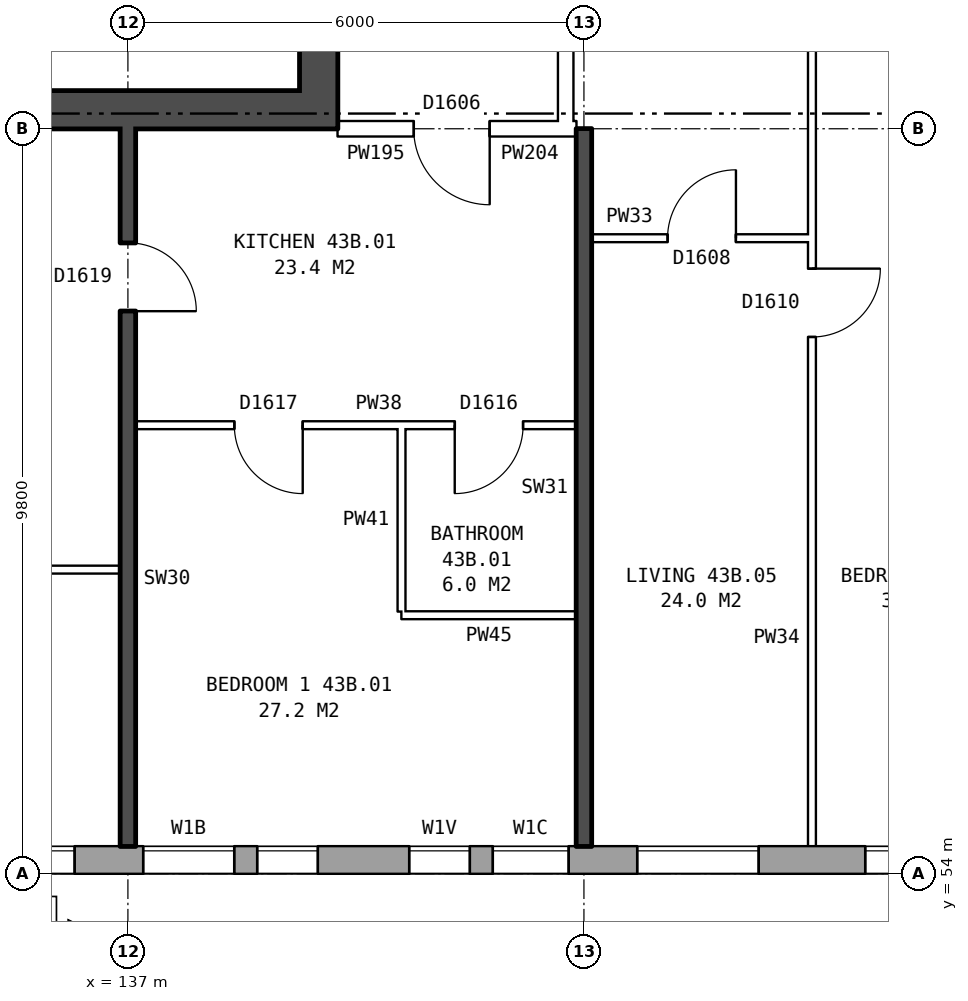
"""IFC4 building model, lengths in metres.
Left out: names, types, materials, properties, quantities, classifications, styles, units other than length and angle.
Written with IfcOpenShell. Run it as: python <this file> out.ifc"""

import sys

from ifc_helpers import new_model, si_unit, direction, frame, frame_2d, origin, place, context, subcontext, project, spatial, rectangle, extrude, element, fill, save


model = new_model("IFC4")
c1 = context("Model", 3, precision=1e-05, world=origin(), true_north=direction((0.0, 1.0)))
c2 = subcontext(c1, "Body", "Model", "MODEL_VIEW")
j1 = project(units=[si_unit("LENGTHUNIT", "METRE"), si_unit("PLANEANGLEUNIT", "RADIAN")], contexts=[c1])
p1 = place(None, origin())
s1 = spatial("IfcSite", under=j1, at=p1, CompositionType="ELEMENT")
p2 = place(p1, origin())
s2 = spatial("IfcBuilding", under=s1, at=p2, CompositionType="ELEMENT")
p3 = place(p2, frame((0.0, 0.0, 154.7)))
s3 = spatial("IfcBuildingStorey", under=s2, at=p3, CompositionType="ELEMENT", Elevation=154.7)
p4 = place(p3, frame((134.075, 54.18, 0.0), z_axis=(0.0, 0.0, 1.0), x_axis=(1.0, 0.0, 0.0)))
e1 = element("IfcWall", 1, at=p4, inside=s3, PredefinedType="STANDARD", context=c2, shape_type="SweptSolid", body=[
    extrude(rectangle(XDim=34.351, YDim=0.36, at=frame_2d((17.175, 0.0))), origin(), (0.0, 0.0, 1.0), 2.85),
])
p5 = place(p4, frame((0.625, 0.0, 0.8)))
e2 = element("IfcOpeningElement", 2, at=p5, cuts=e1, PredefinedType="OPENING", context=c2, shape_type="SweptSolid", body=[
    extrude(rectangle(XDim=1.6, YDim=1.8, at=frame_2d((0.8, 0.9))), frame((0.0, 0.19, 0.0), z_axis=(0.0, -1.0, 0.0), x_axis=(1.0, 0.0, 0.0)), (0.0, 0.0, 1.0), 0.38),
])
p6 = place(p4, frame((3.125, 0.0, 0.8)))
e3 = element("IfcOpeningElement", 3, at=p6, cuts=e1, PredefinedType="OPENING", context=c2, shape_type="SweptSolid", body=[
    extrude(rectangle(XDim=1.2, YDim=1.8, at=frame_2d((0.6, 0.9))), frame((0.0, 0.19, 0.0), z_axis=(0.0, -1.0, 0.0), x_axis=(1.0, 0.0, 0.0)), (0.0, 0.0, 1.0), 0.38),
])
p7 = place(p4, frame((4.625, 0.0, 1.7)))
e4 = element("IfcOpeningElement", 4, at=p7, cuts=e1, PredefinedType="OPENING", context=c2, shape_type="SweptSolid", body=[
    extrude(rectangle(XDim=0.8, YDim=0.9, at=frame_2d((0.4, 0.45))), frame((0.0, 0.19, 0.0), z_axis=(0.0, -1.0, 0.0), x_axis=(1.0, 0.0, 0.0)), (0.0, 0.0, 1.0), 0.38),
])
p8 = place(p4, frame((9.625, 0.0, 0.8)))
e5 = element("IfcOpeningElement", 5, at=p8, cuts=e1, PredefinedType="OPENING", context=c2, shape_type="SweptSolid", body=[
    extrude(rectangle(XDim=1.6, YDim=1.8, at=frame_2d((0.8, 0.9))), frame((0.0, 0.19, 0.0), z_axis=(0.0, -1.0, 0.0), x_axis=(1.0, 0.0, 0.0)), (0.0, 0.0, 1.0), 0.38),
])
p9 = place(p4, frame((12.625, 0.0, 0.8)))
e6 = element("IfcOpeningElement", 6, at=p9, cuts=e1, PredefinedType="OPENING", context=c2, shape_type="SweptSolid", body=[
    extrude(rectangle(XDim=1.6, YDim=1.8, at=frame_2d((0.8, 0.9))), frame((0.0, 0.19, 0.0), z_axis=(0.0, -1.0, 0.0), x_axis=(1.0, 0.0, 0.0)), (0.0, 0.0, 1.0), 0.38),
])
p10 = place(p4, frame((15.625, 0.0, 0.8)))
e7 = element("IfcOpeningElement", 7, at=p10, cuts=e1, PredefinedType="OPENING", context=c2, shape_type="SweptSolid", body=[
    extrude(rectangle(XDim=1.6, YDim=1.8, at=frame_2d((0.8, 0.9))), frame((0.0, 0.19, 0.0), z_axis=(0.0, -1.0, 0.0), x_axis=(1.0, 0.0, 0.0)), (0.0, 0.0, 1.0), 0.38),
])
p11 = place(p4, frame((18.625, 0.0, 0.8)))
e8 = element("IfcOpeningElement", 8, at=p11, cuts=e1, PredefinedType="OPENING", context=c2, shape_type="SweptSolid", body=[
    extrude(rectangle(XDim=1.6, YDim=1.8, at=frame_2d((0.8, 0.9))), frame((0.0, 0.19, 0.0), z_axis=(0.0, -1.0, 0.0), x_axis=(1.0, 0.0, 0.0)), (0.0, 0.0, 1.0), 0.38),
])
p12 = place(p4, frame((21.625, 0.0, 0.8)))
e9 = element("IfcOpeningElement", 9, at=p12, cuts=e1, PredefinedType="OPENING", context=c2, shape_type="SweptSolid", body=[
    extrude(rectangle(XDim=1.6, YDim=1.8, at=frame_2d((0.8, 0.9))), frame((0.0, 0.19, 0.0), z_axis=(0.0, -1.0, 0.0), x_axis=(1.0, 0.0, 0.0)), (0.0, 0.0, 1.0), 0.38),
])
p13 = place(p4, frame((24.625, 0.0, 0.8)))
e10 = element("IfcOpeningElement", 10, at=p13, cuts=e1, PredefinedType="OPENING", context=c2, shape_type="SweptSolid", body=[
    extrude(rectangle(XDim=1.6, YDim=1.8, at=frame_2d((0.8, 0.9))), frame((0.0, 0.19, 0.0), z_axis=(0.0, -1.0, 0.0), x_axis=(1.0, 0.0, 0.0)), (0.0, 0.0, 1.0), 0.38),
])
p14 = place(p4, frame((27.125, 0.0, 0.8)))
e11 = element("IfcOpeningElement", 11, at=p14, cuts=e1, PredefinedType="OPENING", context=c2, shape_type="SweptSolid", body=[
    extrude(rectangle(XDim=0.6, YDim=0.9, at=frame_2d((0.3, 0.45))), frame((0.0, 0.19, 0.0), z_axis=(0.0, -1.0, 0.0), x_axis=(1.0, 0.0, 0.0)), (0.0, 0.0, 1.0), 0.38),
])
p15 = place(p4, frame((30.625, 0.0, 0.8)))
e12 = element("IfcOpeningElement", 12, at=p15, cuts=e1, PredefinedType="OPENING", context=c2, shape_type="SweptSolid", body=[
    extrude(rectangle(XDim=1.6, YDim=1.8, at=frame_2d((0.8, 0.9))), frame((0.0, 0.19, 0.0), z_axis=(0.0, -1.0, 0.0), x_axis=(1.0, 0.0, 0.0)), (0.0, 0.0, 1.0), 0.38),
])
p16 = place(p4, frame((6.625, 0.0, 0.8)))
e13 = element("IfcOpeningElement", 13, at=p16, cuts=e1, PredefinedType="OPENING", context=c2, shape_type="SweptSolid", body=[
    extrude(rectangle(XDim=0.8, YDim=0.9, at=frame_2d((0.4, 0.45))), frame((0.0, 0.19, 0.0), z_axis=(0.0, -1.0, 0.0), x_axis=(1.0, 0.0, 0.0)), (0.0, 0.0, 1.0), 0.38),
])
p17 = place(p4, frame((7.725, 0.0, 0.8)))
e14 = element("IfcOpeningElement", 14, at=p17, cuts=e1, PredefinedType="OPENING", context=c2, shape_type="SweptSolid", body=[
    extrude(rectangle(XDim=1.0, YDim=1.8, at=frame_2d((0.5, 0.9))), frame((0.0, 0.19, 0.0), z_axis=(0.0, -1.0, 0.0), x_axis=(1.0, 0.0, 0.0)), (0.0, 0.0, 1.0), 0.38),
])
p18 = place(p4, frame((28.925, 0.0, 1.7)))
e15 = element("IfcOpeningElement", 15, at=p18, cuts=e1, PredefinedType="OPENING", context=c2, shape_type="SweptSolid", body=[
    extrude(rectangle(XDim=1.4, YDim=0.9, at=frame_2d((0.7, 0.45))), frame((0.0, 0.19, 0.0), z_axis=(0.0, -1.0, 0.0), x_axis=(1.0, 0.0, 0.0)), (0.0, 0.0, 1.0), 0.38),
])
p19 = place(p3, frame((139.51, 63.8, 0.0), z_axis=(0.0, 0.0, 1.0), x_axis=(0.0, 1.0, 0.0)))
e16 = element("IfcWall", 16, at=p19, inside=s3, PredefinedType="SHEAR", context=c2, shape_type="SweptSolid", body=[
    extrude(rectangle(XDim=12.4, YDim=0.5, at=frame_2d((6.2, 0.0))), origin(), (0.0, 0.0, 1.0), 2.85),
])
p20 = place(p19, frame((1.325, 0.0, 0.0)))
e17 = element("IfcOpeningElement", 17, at=p20, cuts=e16, PredefinedType="OPENING", context=c2, shape_type="SweptSolid", body=[
    extrude(rectangle(XDim=1.1, YDim=2.1, at=frame_2d((0.55, 1.05))), frame((0.0, 0.26, 0.0), z_axis=(0.0, -1.0, 0.0), x_axis=(1.0, 0.0, 0.0)), (0.0, 0.0, 1.0), 0.52),
])
p21 = place(p19, frame((3.6, 0.0, 0.0)))
e18 = element("IfcOpeningElement", 18, at=p21, cuts=e16, PredefinedType="OPENING", context=c2, shape_type="SweptSolid", body=[
    extrude(rectangle(XDim=1.1, YDim=2.1, at=frame_2d((0.55, 1.05))), frame((0.0, 0.26, 0.0), z_axis=(0.0, -1.0, 0.0), x_axis=(1.0, 0.0, 0.0)), (0.0, 0.0, 1.0), 0.52),
])
p22 = place(p19, frame((5.8, 0.0, 0.0)))
e19 = element("IfcOpeningElement", 19, at=p22, cuts=e16, PredefinedType="OPENING", context=c2, shape_type="SweptSolid", body=[
    extrude(rectangle(XDim=1.1, YDim=2.1, at=frame_2d((0.55, 1.05))), frame((0.0, 0.26, 0.0), z_axis=(0.0, -1.0, 0.0), x_axis=(1.0, 0.0, 0.0)), (0.0, 0.0, 1.0), 0.52),
])
p23 = place(p19, frame((9.9, 0.0, 0.0)))
e20 = element("IfcOpeningElement", 20, at=p23, cuts=e16, PredefinedType="OPENING", context=c2, shape_type="SweptSolid", body=[
    extrude(rectangle(XDim=1.1, YDim=2.1, at=frame_2d((0.55, 1.05))), frame((0.0, 0.26, 0.0), z_axis=(0.0, -1.0, 0.0), x_axis=(1.0, 0.0, 0.0)), (0.0, 0.0, 1.0), 0.52),
])
p24 = place(p19, frame((8.125, 0.0, 0.0)))
e21 = element("IfcOpeningElement", 21, at=p24, cuts=e16, PredefinedType="OPENING", context=c2, shape_type="SweptSolid", body=[
    extrude(rectangle(XDim=0.85, YDim=2.1, at=frame_2d((0.425, 1.05))), frame((0.0, 0.26, 0.0), z_axis=(0.0, -1.0, 0.0), x_axis=(1.0, 0.0, 0.0)), (0.0, 0.0, 1.0), 0.52),
])
p25 = place(p3, frame((139.26, 64.05, 0.0), z_axis=(0.0, 0.0, 1.0), x_axis=(-1.0, 0.0, 0.0)))
e22 = element("IfcWall", 22, at=p25, inside=s3, PredefinedType="SHEAR", context=c2, shape_type="SweptSolid", body=[
    extrude(rectangle(XDim=7.4, YDim=0.5, at=frame_2d((3.7, 0.0))), origin(), (0.0, 0.0, 1.0), 2.85),
])
p26 = place(p3, frame((142.76, 63.9, 0.0), z_axis=(0.0, 0.0, 1.0), x_axis=(0.0, 1.0, 0.0)))
e23 = element("IfcWall", 23, at=p26, inside=s3, PredefinedType="PARTITIONING", context=c2, shape_type="SweptSolid", body=[
    extrude(rectangle(XDim=12.2, YDim=0.2, at=frame_2d((6.1, 0.0))), origin(), (0.0, 0.0, 1.0), 2.85),
])
p27 = place(p26, frame((5.1, 0.0, 0.0)))
e24 = element("IfcOpeningElement", 24, at=p27, cuts=e23, PredefinedType="OPENING", context=c2, shape_type="SweptSolid", body=[
    extrude(rectangle(XDim=2.0, YDim=2.1, at=frame_2d((1.0, 1.05))), frame((0.0, 0.11, 0.0), z_axis=(0.0, -1.0, 0.0), x_axis=(1.0, 0.0, 0.0)), (0.0, 0.0, 1.0), 0.22),
])
p28 = place(p3, frame((140.6, 57.4, 0.0), z_axis=(0.0, 0.0, 1.0), x_axis=(1.0, 0.0, 0.0)))
e25 = element("IfcWall", 25, at=p28, inside=s3, PredefinedType="PARTITIONING", context=c2, shape_type="SweptSolid", body=[
    extrude(rectangle(XDim=2.3, YDim=0.1, at=frame_2d((1.15, 0.0))), origin(), (0.0, 0.0, 1.0), 2.85),
])
p29 = place(p3, frame((131.36, 58.0, 0.0), z_axis=(0.0, 0.0, 1.0), x_axis=(1.0, 0.0, 0.0)))
e26 = element("IfcWall", 26, at=p29, inside=s3, PredefinedType="PARTITIONING", context=c2, shape_type="SweptSolid", body=[
    extrude(rectangle(XDim=5.54, YDim=0.1, at=frame_2d((2.77, 0.0))), origin(), (0.0, 0.0, 1.0), 2.85),
])
p30 = place(p29, frame((2.32, 0.0, 0.0)))
e27 = element("IfcOpeningElement", 27, at=p30, cuts=e26, PredefinedType="OPENING", context=c2, shape_type="SweptSolid", body=[
    extrude(rectangle(XDim=0.9, YDim=2.1, at=frame_2d((0.45, 1.05))), frame((0.0, 0.06, 0.0), z_axis=(0.0, -1.0, 0.0), x_axis=(1.0, 0.0, 0.0)), (0.0, 0.0, 1.0), 0.12),
])
p31 = place(p3, frame((137.1, 59.9, 0.0), z_axis=(0.0, 0.0, 1.0), x_axis=(1.0, 0.0, 0.0)))
e28 = element("IfcWall", 28, at=p31, inside=s3, PredefinedType="PARTITIONING", context=c2, shape_type="SweptSolid", body=[
    extrude(rectangle(XDim=5.8, YDim=0.1, at=frame_2d((2.9, 0.0))), origin(), (0.0, 0.0, 1.0), 2.85),
])
p32 = place(p31, frame((1.3, 0.0, 0.0)))
e29 = element("IfcOpeningElement", 29, at=p32, cuts=e28, PredefinedType="OPENING", context=c2, shape_type="SweptSolid", body=[
    extrude(rectangle(XDim=0.9, YDim=2.1, at=frame_2d((0.45, 1.05))), frame((0.0, 0.06, 0.0), z_axis=(0.0, -1.0, 0.0), x_axis=(1.0, 0.0, 0.0)), (0.0, 0.0, 1.0), 0.12),
])
p33 = place(p31, frame((4.2, 0.0, 0.0)))
e30 = element("IfcOpeningElement", 30, at=p33, cuts=e28, PredefinedType="OPENING", context=c2, shape_type="SweptSolid", body=[
    extrude(rectangle(XDim=0.9, YDim=2.1, at=frame_2d((0.45, 1.05))), frame((0.0, 0.06, 0.0), z_axis=(0.0, -1.0, 0.0), x_axis=(1.0, 0.0, 0.0)), (0.0, 0.0, 1.0), 0.12),
])
p34 = place(p3, frame((143.1, 62.36, 0.0), z_axis=(0.0, 0.0, 1.0), x_axis=(1.0, 0.0, 0.0)))
e31 = element("IfcWall", 31, at=p34, inside=s3, PredefinedType="PARTITIONING", context=c2, shape_type="SweptSolid", body=[
    extrude(rectangle(XDim=2.9, YDim=0.1, at=frame_2d((1.45, 0.0))), origin(), (0.0, 0.0, 1.0), 2.85),
])
p35 = place(p34, frame((1.0, 0.0, 0.0)))
e32 = element("IfcOpeningElement", 32, at=p35, cuts=e31, PredefinedType="OPENING", context=c2, shape_type="SweptSolid", body=[
    extrude(rectangle(XDim=0.9, YDim=2.1, at=frame_2d((0.45, 1.05))), frame((0.0, 0.06, 0.0), z_axis=(0.0, -1.0, 0.0), x_axis=(1.0, 0.0, 0.0)), (0.0, 0.0, 1.0), 0.12),
])
p36 = place(p3, frame((139.76, 63.8, 0.0), z_axis=(0.0, 0.0, 1.0), x_axis=(1.0, 0.0, 0.0)))
e33 = element("IfcWall", 33, at=p36, inside=s3, PredefinedType="PARTITIONING", context=c2, shape_type="SweptSolid", body=[
    extrude(rectangle(XDim=3.0, YDim=0.2, at=frame_2d((1.5, 0.0))), origin(), (0.0, 0.0, 1.0), 2.85),
])
p37 = place(p36, frame((1.0, 0.0, 0.0)))
e34 = element("IfcOpeningElement", 34, at=p37, cuts=e33, PredefinedType="OPENING", context=c2, shape_type="SweptSolid", body=[
    extrude(rectangle(XDim=1.0, YDim=2.1, at=frame_2d((0.5, 1.05))), frame((0.0, 0.11, 0.0), z_axis=(0.0, -1.0, 0.0), x_axis=(1.0, 0.0, 0.0)), (0.0, 0.0, 1.0), 0.22),
])
p38 = place(p3, frame((142.76, 63.8, 0.0), z_axis=(0.0, 0.0, 1.0), x_axis=(1.0, 0.0, 0.0)))
e35 = element("IfcWall", 35, at=p38, inside=s3, PredefinedType="PARTITIONING", context=c2, shape_type="SweptSolid", body=[
    extrude(rectangle(XDim=0.14, YDim=0.2, at=frame_2d((0.07, 0.0))), origin(), (0.0, 0.0, 1.0), 2.85),
])
p39 = place(p3, frame((137.0, 54.36, 0.0), z_axis=(0.0, 0.0, 1.0), x_axis=(0.0, 1.0, 0.0)))
e36 = element("IfcWall", 36, at=p39, inside=s3, PredefinedType="SOLIDWALL", context=c2, shape_type="SweptSolid", body=[
    extrude(rectangle(XDim=9.44, YDim=0.2, at=frame_2d((4.72, 0.0))), origin(), (0.0, 0.0, 1.0), 2.85),
])
p40 = place(p39, frame((7.04, 0.0, 0.0)))
e37 = element("IfcOpeningElement", 37, at=p40, cuts=e36, PredefinedType="OPENING", context=c2, shape_type="SweptSolid", body=[
    extrude(rectangle(XDim=0.9, YDim=2.1, at=frame_2d((0.45, 1.05))), frame((0.0, 0.11, 0.0), z_axis=(0.0, -1.0, 0.0), x_axis=(1.0, 0.0, 0.0)), (0.0, 0.0, 1.0), 0.22),
])
p41 = place(p3, frame((140.6, 57.45, 0.0), z_axis=(0.0, 0.0, 1.0), x_axis=(0.0, 1.0, 0.0)))
e38 = element("IfcWall", 38, at=p41, inside=s3, PredefinedType="PARTITIONING", context=c2, shape_type="SweptSolid", body=[
    extrude(rectangle(XDim=2.4, YDim=0.1, at=frame_2d((1.2, 0.0))), origin(), (0.0, 0.0, 1.0), 2.85),
])
p42 = place(p3, frame((143.0, 54.36, 0.0), z_axis=(0.0, 0.0, 1.0), x_axis=(0.0, 1.0, 0.0)))
e39 = element("IfcWall", 39, at=p42, inside=s3, PredefinedType="SOLIDWALL", context=c2, shape_type="SweptSolid", body=[
    extrude(rectangle(XDim=9.44, YDim=0.2, at=frame_2d((4.72, 0.0))), origin(), (0.0, 0.0, 1.0), 2.85),
])
p43 = place(p3, frame((146.0, 54.36, 0.0), z_axis=(0.0, 0.0, 1.0), x_axis=(0.0, 1.0, 0.0)))
e40 = element("IfcWall", 40, at=p43, inside=s3, PredefinedType="PARTITIONING", context=c2, shape_type="SweptSolid", body=[
    extrude(rectangle(XDim=14.34, YDim=0.1, at=frame_2d((7.17, 0.0))), origin(), (0.0, 0.0, 1.0), 2.85),
])
p44 = place(p43, frame((6.7, 0.0, 0.0)))
e41 = element("IfcOpeningElement", 41, at=p44, cuts=e40, PredefinedType="OPENING", context=c2, shape_type="SweptSolid", body=[
    extrude(rectangle(XDim=0.9, YDim=2.1, at=frame_2d((0.45, 1.05))), frame((0.0, 0.06, 0.0), z_axis=(0.0, -1.0, 0.0), x_axis=(1.0, 0.0, 0.0)), (0.0, 0.0, 1.0), 0.12),
])
p45 = place(p43, frame((13.04, 0.0, 0.0)))
e42 = element("IfcOpeningElement", 42, at=p45, cuts=e40, PredefinedType="OPENING", context=c2, shape_type="SweptSolid", body=[
    extrude(rectangle(XDim=0.9, YDim=2.1, at=frame_2d((0.45, 1.05))), frame((0.0, 0.06, 0.0), z_axis=(0.0, -1.0, 0.0), x_axis=(1.0, 0.0, 0.0)), (0.0, 0.0, 1.0), 0.12),
])
p46 = place(p5, origin())
e43 = element("IfcWindow", 43, at=p46, inside=s3, PartitioningType="SINGLE_PANEL", PredefinedType="WINDOW", context=c2, shape_type="SweptSolid", body=[
    extrude(rectangle(XDim=1.6, YDim=1.8, at=frame_2d((0.8, 0.9))), frame((0.0, 0.15, 0.0), z_axis=(0.0, -1.0, 0.0), x_axis=(1.0, 0.0, 0.0)), (0.0, 0.0, 1.0), 0.06),
])
fill(e2, e43)
p47 = place(p6, origin())
e44 = element("IfcWindow", 44, at=p47, inside=s3, PartitioningType="SINGLE_PANEL", PredefinedType="WINDOW", context=c2, shape_type="SweptSolid", body=[
    extrude(rectangle(XDim=1.2, YDim=1.8, at=frame_2d((0.6, 0.9))), frame((0.0, 0.15, 0.0), z_axis=(0.0, -1.0, 0.0), x_axis=(1.0, 0.0, 0.0)), (0.0, 0.0, 1.0), 0.06),
])
fill(e3, e44)
p48 = place(p7, origin())
e45 = element("IfcWindow", 45, at=p48, inside=s3, PartitioningType="SINGLE_PANEL", PredefinedType="WINDOW", context=c2, shape_type="SweptSolid", body=[
    extrude(rectangle(XDim=0.8, YDim=0.9, at=frame_2d((0.4, 0.45))), frame((0.0, 0.15, 0.0), z_axis=(0.0, -1.0, 0.0), x_axis=(1.0, 0.0, 0.0)), (0.0, 0.0, 1.0), 0.06),
])
fill(e4, e45)
p49 = place(p8, origin())
e46 = element("IfcWindow", 46, at=p49, inside=s3, PartitioningType="SINGLE_PANEL", PredefinedType="WINDOW", context=c2, shape_type="SweptSolid", body=[
    extrude(rectangle(XDim=1.6, YDim=1.8, at=frame_2d((0.8, 0.9))), frame((0.0, 0.15, 0.0), z_axis=(0.0, -1.0, 0.0), x_axis=(1.0, 0.0, 0.0)), (0.0, 0.0, 1.0), 0.06),
])
fill(e5, e46)
p50 = place(p9, origin())
e47 = element("IfcWindow", 47, at=p50, inside=s3, PartitioningType="SINGLE_PANEL", PredefinedType="WINDOW", context=c2, shape_type="SweptSolid", body=[
    extrude(rectangle(XDim=1.6, YDim=1.8, at=frame_2d((0.8, 0.9))), frame((0.0, 0.15, 0.0), z_axis=(0.0, -1.0, 0.0), x_axis=(1.0, 0.0, 0.0)), (0.0, 0.0, 1.0), 0.06),
])
fill(e6, e47)
p51 = place(p32, frame((0.9, 0.0, 0.0), z_axis=(0.0, 0.0, 1.0), x_axis=(-1.0, 0.0, 0.0)))
e48 = element("IfcDoor", 48, at=p51, inside=s3, OperationType="SINGLE_SWING_LEFT", PredefinedType="DOOR", context=c2, shape_type="SweptSolid", body=[
    extrude(rectangle(XDim=0.9, YDim=2.1, at=frame_2d((0.45, 1.05))), frame((0.0, 0.025, 0.0), z_axis=(0.0, -1.0, 0.0), x_axis=(1.0, 0.0, 0.0)), (0.0, 0.0, 1.0), 0.05),
])
fill(e29, e48)
p52 = place(p37, frame((1.0, 0.0, 0.0), z_axis=(0.0, 0.0, 1.0), x_axis=(-1.0, 0.0, 0.0)))
e49 = element("IfcDoor", 49, at=p52, inside=s3, OperationType="SINGLE_SWING_LEFT", PredefinedType="DOOR", context=c2, shape_type="SweptSolid", body=[
    extrude(rectangle(XDim=1.0, YDim=2.1, at=frame_2d((0.5, 1.05))), frame((0.0, 0.025, 0.0), z_axis=(0.0, -1.0, 0.0), x_axis=(1.0, 0.0, 0.0)), (0.0, 0.0, 1.0), 0.05),
])
fill(e34, e49)
p53 = place(p40, frame((0.9, 0.0, 0.0), z_axis=(0.0, 0.0, 1.0), x_axis=(-1.0, 0.0, 0.0)))
e50 = element("IfcDoor", 50, at=p53, inside=s3, OperationType="SINGLE_SWING_RIGHT", PredefinedType="DOOR", context=c2, shape_type="SweptSolid", body=[
    extrude(rectangle(XDim=0.9, YDim=2.1, at=frame_2d((0.45, 1.05))), frame((0.0, 0.025, 0.0), z_axis=(0.0, -1.0, 0.0), x_axis=(1.0, 0.0, 0.0)), (0.0, 0.0, 1.0), 0.05),
])
fill(e37, e50)
p54 = place(p33, frame((0.9, 0.0, 0.0), z_axis=(0.0, 0.0, 1.0), x_axis=(-1.0, 0.0, 0.0)))
e51 = element("IfcDoor", 51, at=p54, inside=s3, OperationType="SINGLE_SWING_RIGHT", PredefinedType="DOOR", context=c2, shape_type="SweptSolid", body=[
    extrude(rectangle(XDim=0.9, YDim=2.1, at=frame_2d((0.45, 1.05))), frame((0.0, 0.025, 0.0), z_axis=(0.0, -1.0, 0.0), x_axis=(1.0, 0.0, 0.0)), (0.0, 0.0, 1.0), 0.05),
])
fill(e30, e51)
p55 = place(p44, frame((0.9, 0.0, 0.0), z_axis=(0.0, 0.0, 1.0), x_axis=(-1.0, 0.0, 0.0)))
e52 = element("IfcDoor", 52, at=p55, inside=s3, OperationType="SINGLE_SWING_LEFT", PredefinedType="DOOR", context=c2, shape_type="SweptSolid", body=[
    extrude(rectangle(XDim=0.9, YDim=2.1, at=frame_2d((0.45, 1.05))), frame((0.0, 0.025, 0.0), z_axis=(0.0, -1.0, 0.0), x_axis=(1.0, 0.0, 0.0)), (0.0, 0.0, 1.0), 0.05),
])
fill(e41, e52)
p56 = place(p35, origin())
e53 = element("IfcDoor", 53, at=p56, inside=s3, OperationType="SINGLE_SWING_RIGHT", PredefinedType="DOOR", context=c2, shape_type="SweptSolid", body=[
    extrude(rectangle(XDim=0.9, YDim=2.1, at=frame_2d((0.45, 1.05))), frame((0.0, 0.025, 0.0), z_axis=(0.0, -1.0, 0.0), x_axis=(1.0, 0.0, 0.0)), (0.0, 0.0, 1.0), 0.05),
])
fill(e32, e53)
p57 = place(p16, origin())
e54 = element("IfcWindow", 54, at=p57, inside=s3, PartitioningType="SINGLE_PANEL", PredefinedType="WINDOW", context=c2, shape_type="SweptSolid", body=[
    extrude(rectangle(XDim=0.8, YDim=0.9, at=frame_2d((0.4, 0.45))), frame((0.0, 0.15, 0.0), z_axis=(0.0, -1.0, 0.0), x_axis=(1.0, 0.0, 0.0)), (0.0, 0.0, 1.0), 0.06),
])
fill(e13, e54)
p58 = place(p17, origin())
e55 = element("IfcWindow", 55, at=p58, inside=s3, PartitioningType="SINGLE_PANEL", PredefinedType="WINDOW", context=c2, shape_type="SweptSolid", body=[
    extrude(rectangle(XDim=1.0, YDim=1.8, at=frame_2d((0.5, 0.9))), frame((0.0, 0.15, 0.0), z_axis=(0.0, -1.0, 0.0), x_axis=(1.0, 0.0, 0.0)), (0.0, 0.0, 1.0), 0.06),
])
fill(e14, e55)
save(model, sys.argv[1])
